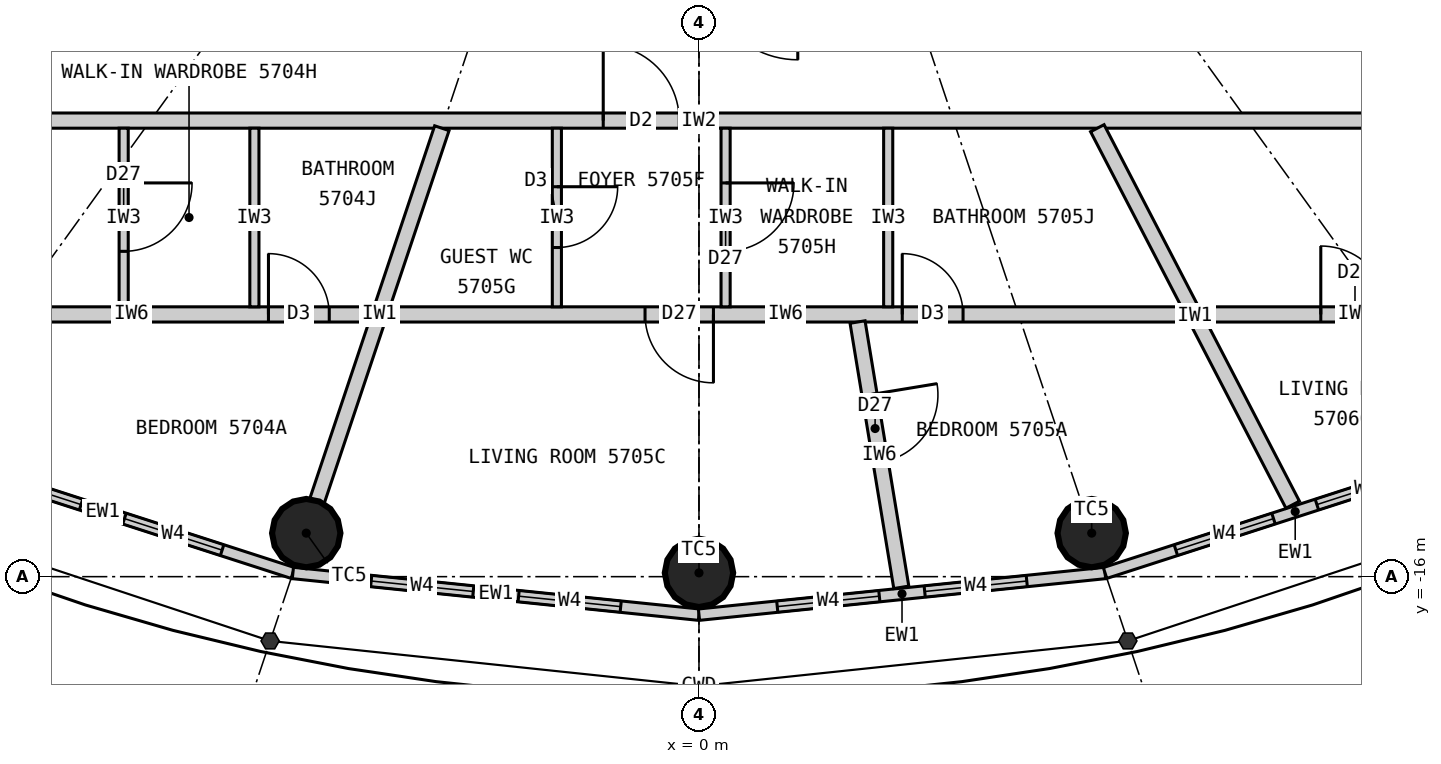
"""IFC4 building model, lengths in metres.
Left out: names, types, materials, properties, quantities, classifications, styles, units other than length and angle.
Written with IfcOpenShell. Run it as: python <this file> out.ifc"""

import sys

from ifc_helpers import new_model, si_unit, direction, frame, frame_2d, origin, origin_2d, place, context, subcontext, project, spatial, rectangle, circle, extrude, element, fill, save


model = new_model("IFC4")
c1 = context("Model", 3, precision=1e-05, world=origin(), true_north=direction((0.0, 1.0)))
c2 = subcontext(c1, "Body", "Model", "MODEL_VIEW")
j1 = project(units=[si_unit("LENGTHUNIT", "METRE"), si_unit("PLANEANGLEUNIT", "RADIAN")], contexts=[c1])
p1 = place(None, origin())
s1 = spatial("IfcSite", under=j1, at=p1, CompositionType="ELEMENT")
p2 = place(p1, origin())
s2 = spatial("IfcBuilding", under=s1, at=p2, CompositionType="ELEMENT")
p3 = place(p2, frame((0.0, 0.0, 212.7)))
s3 = spatial("IfcBuildingStorey", under=s2, at=p3, CompositionType="ELEMENT", Elevation=212.7)
for number, where, z_axis, x_axis in (
    (1, (-5.167, -15.427, 0.0), (0.0, 0.0, 1.0), (1.0, 0.0, 0.0)),
    (2, (0.0, -15.95, 0.0), (0.0, 0.0, 1.0), (1.0, 0.0, 0.0)),
    (3, (5.167, -15.427, 0.0), (0.0, 0.0, 1.0), (1.0, 0.0, 0.0)),
):
    element("IfcColumn", number, at=place(p3, frame(where, z_axis=z_axis, x_axis=x_axis)), inside=s3, PredefinedType="COLUMN", context=c2, shape_type="SweptSolid", body=[
        extrude(circle(Radius=0.45, at=origin_2d()), origin(), (0.0, 0.0, 1.0), 3.3),
    ])
p4 = place(p3, frame((-10.346, -14.336, 0.0), z_axis=(0.0, 0.0, 1.0), x_axis=(0.951644702515, -0.307200846638, 0.0)))
e4 = element("IfcWall", 4, at=p4, inside=s3, PredefinedType="ELEMENTEDWALL", context=c2, shape_type="SweptSolid", body=[
    extrude(rectangle(XDim=5.258, YDim=0.15, at=frame_2d((2.629, 0.0))), origin(), (0.0, 0.0, 1.0), 3.12),
])
p5 = place(p4, frame((0.979, 0.0, 0.9)))
e5 = element("IfcOpeningElement", 5, at=p5, cuts=e4, PredefinedType="OPENING", context=c2, shape_type="SweptSolid", body=[
    extrude(rectangle(XDim=1.35, YDim=1.9, at=frame_2d((0.675, 0.95))), frame((0.0, 0.085, 0.0), z_axis=(0.0, -1.0, 0.0), x_axis=(1.0, 0.0, 0.0)), (0.0, 0.0, 1.0), 0.17),
])
p6 = place(p4, frame((2.929, 0.0, 0.9)))
e6 = element("IfcOpeningElement", 6, at=p6, cuts=e4, PredefinedType="OPENING", context=c2, shape_type="SweptSolid", body=[
    extrude(rectangle(XDim=1.35, YDim=1.9, at=frame_2d((0.675, 0.95))), frame((0.0, 0.085, 0.0), z_axis=(0.0, -1.0, 0.0), x_axis=(1.0, 0.0, 0.0)), (0.0, 0.0, 1.0), 0.17),
])
p7 = place(p3, frame((-5.343, -15.952, 0.0), z_axis=(0.0, 0.0, 1.0), x_axis=(0.994774574972, -0.102095763818, 0.0)))
e7 = element("IfcWall", 7, at=p7, inside=s3, PredefinedType="ELEMENTEDWALL", context=c2, shape_type="SweptSolid", body=[
    extrude(rectangle(XDim=5.371, YDim=0.15, at=frame_2d((2.686, 0.0))), origin(), (0.0, 0.0, 1.0), 3.12),
])
p8 = place(p7, frame((1.035, 0.0, 0.9)))
e8 = element("IfcOpeningElement", 8, at=p8, cuts=e7, PredefinedType="OPENING", context=c2, shape_type="SweptSolid", body=[
    extrude(rectangle(XDim=1.35, YDim=1.9, at=frame_2d((0.675, 0.95))), frame((0.0, 0.085, 0.0), z_axis=(0.0, -1.0, 0.0), x_axis=(1.0, 0.0, 0.0)), (0.0, 0.0, 1.0), 0.17),
])
p9 = place(p7, frame((2.985, 0.0, 0.9)))
e9 = element("IfcOpeningElement", 9, at=p9, cuts=e7, PredefinedType="OPENING", context=c2, shape_type="SweptSolid", body=[
    extrude(rectangle(XDim=1.35, YDim=1.9, at=frame_2d((0.675, 0.95))), frame((0.0, 0.085, 0.0), z_axis=(0.0, -1.0, 0.0), x_axis=(1.0, 0.0, 0.0)), (0.0, 0.0, 1.0), 0.17),
])
p10 = place(p3, frame((0.0, -16.5, 0.0), z_axis=(0.0, 0.0, 1.0), x_axis=(0.994774574972, 0.102095763818, 0.0)))
e10 = element("IfcWall", 10, at=p10, inside=s3, PredefinedType="ELEMENTEDWALL", context=c2, shape_type="SweptSolid", body=[
    extrude(rectangle(XDim=5.371, YDim=0.15, at=frame_2d((2.686, 0.0))), origin(), (0.0, 0.0, 1.0), 3.12),
])
p11 = place(p10, frame((1.035, 0.0, 0.9)))
e11 = element("IfcOpeningElement", 11, at=p11, cuts=e10, PredefinedType="OPENING", context=c2, shape_type="SweptSolid", body=[
    extrude(rectangle(XDim=1.35, YDim=1.9, at=frame_2d((0.675, 0.95))), frame((0.0, 0.085, 0.0), z_axis=(0.0, -1.0, 0.0), x_axis=(1.0, 0.0, 0.0)), (0.0, 0.0, 1.0), 0.17),
])
p12 = place(p10, frame((2.985, 0.0, 0.9)))
e12 = element("IfcOpeningElement", 12, at=p12, cuts=e10, PredefinedType="OPENING", context=c2, shape_type="SweptSolid", body=[
    extrude(rectangle(XDim=1.35, YDim=1.9, at=frame_2d((0.675, 0.95))), frame((0.0, 0.085, 0.0), z_axis=(0.0, -1.0, 0.0), x_axis=(1.0, 0.0, 0.0)), (0.0, 0.0, 1.0), 0.17),
])
p13 = place(p3, frame((5.343, -15.952, 0.0), z_axis=(0.0, 0.0, 1.0), x_axis=(0.951644702515, 0.307200846638, 0.0)))
e13 = element("IfcWall", 13, at=p13, inside=s3, PredefinedType="ELEMENTEDWALL", context=c2, shape_type="SweptSolid", body=[
    extrude(rectangle(XDim=5.258, YDim=0.15, at=frame_2d((2.629, 0.0))), origin(), (0.0, 0.0, 1.0), 3.12),
])
p14 = place(p13, frame((0.979, 0.0, 0.9)))
e14 = element("IfcOpeningElement", 14, at=p14, cuts=e13, PredefinedType="OPENING", context=c2, shape_type="SweptSolid", body=[
    extrude(rectangle(XDim=1.35, YDim=1.9, at=frame_2d((0.675, 0.95))), frame((0.0, 0.085, 0.0), z_axis=(0.0, -1.0, 0.0), x_axis=(1.0, 0.0, 0.0)), (0.0, 0.0, 1.0), 0.17),
])
p15 = place(p13, frame((2.929, 0.0, 0.9)))
e15 = element("IfcOpeningElement", 15, at=p15, cuts=e13, PredefinedType="OPENING", context=c2, shape_type="SweptSolid", body=[
    extrude(rectangle(XDim=1.35, YDim=1.9, at=frame_2d((0.675, 0.95))), frame((0.0, 0.085, 0.0), z_axis=(0.0, -1.0, 0.0), x_axis=(1.0, 0.0, 0.0)), (0.0, 0.0, 1.0), 0.17),
])
p16 = place(p3, frame((11.1, -10.0, 0.0), z_axis=(0.0, 0.0, 1.0), x_axis=(-1.0, 0.0, 0.0)))
e16 = element("IfcWall", 16, at=p16, inside=s3, PredefinedType="PARTITIONING", context=c2, shape_type="SweptSolid", body=[
    extrude(rectangle(XDim=22.2, YDim=0.2, at=frame_2d((11.1, 0.0))), origin(), (0.0, 0.0, 1.0), 3.12),
])
p17 = place(p16, frame((11.36, 0.0, 0.0)))
e17 = element("IfcOpeningElement", 17, at=p17, cuts=e16, PredefinedType="OPENING", context=c2, shape_type="SweptSolid", body=[
    extrude(rectangle(XDim=1.0, YDim=2.2, at=frame_2d((0.5, 1.1))), frame((0.0, 0.11, 0.0), z_axis=(0.0, -1.0, 0.0), x_axis=(1.0, 0.0, 0.0)), (0.0, 0.0, 1.0), 0.22),
])
p18 = place(p16, frame((0.595, 0.0, 0.0)))
e18 = element("IfcOpeningElement", 18, at=p18, cuts=e16, PredefinedType="OPENING", context=c2, shape_type="SweptSolid", body=[
    extrude(rectangle(XDim=1.0, YDim=2.2, at=frame_2d((0.5, 1.1))), frame((0.0, 0.11, 0.0), z_axis=(0.0, -1.0, 0.0), x_axis=(1.0, 0.0, 0.0)), (0.0, 0.0, 1.0), 0.22),
])
p19 = place(p3, frame((-3.383, -10.1, 0.0), z_axis=(0.0, 0.0, 1.0), x_axis=(-0.317602151035, -0.948224063003, 0.0)))
e19 = element("IfcWall", 19, at=p19, inside=s3, PredefinedType="PARTITIONING", context=c2, shape_type="SweptSolid", body=[
    extrude(rectangle(XDim=5.168, YDim=0.2, at=frame_2d((2.584, 0.0))), origin(), (0.0, 0.0, 1.0), 2.42),
])
p20 = place(p3, frame((5.241, -10.1, 0.0), z_axis=(0.0, 0.0, 1.0), x_axis=(0.460603196597, -0.887606160008, 0.0)))
e20 = element("IfcWall", 20, at=p20, inside=s3, PredefinedType="PARTITIONING", context=c2, shape_type="SweptSolid", body=[
    extrude(rectangle(XDim=5.58, YDim=0.2, at=frame_2d((2.79, 0.0))), origin(), (0.0, 0.0, 1.0), 3.12),
])
p21 = place(p3, frame((-10.609, -12.55, 0.0), z_axis=(0.0, 0.0, 1.0), x_axis=(1.0, 0.0, 0.0)))
e21 = element("IfcWall", 21, at=p21, inside=s3, PredefinedType="PARTITIONING", context=c2, shape_type="SweptSolid", body=[
    extrude(rectangle(XDim=6.284, YDim=0.2, at=frame_2d((3.142, 0.0))), origin(), (0.0, 0.0, 1.0), 3.12),
])
p22 = place(p21, frame((4.944, 0.0, 0.0)))
e22 = element("IfcOpeningElement", 22, at=p22, cuts=e21, PredefinedType="OPENING", context=c2, shape_type="SweptSolid", body=[
    extrude(rectangle(XDim=0.8, YDim=2.1, at=frame_2d((0.4, 1.05))), frame((0.0, 0.11, 0.0), z_axis=(0.0, -1.0, 0.0), x_axis=(1.0, 0.0, 0.0)), (0.0, 0.0, 1.0), 0.22),
])
p23 = place(p3, frame((-7.569, -10.1, 0.0), z_axis=(0.0, 0.0, 1.0), x_axis=(0.0, -1.0, 0.0)))
e23 = element("IfcWall", 23, at=p23, inside=s3, PredefinedType="PARTITIONING", context=c2, shape_type="SweptSolid", body=[
    extrude(rectangle(XDim=2.35, YDim=0.12, at=frame_2d((1.175, 0.0))), origin(), (0.0, 0.0, 1.0), 3.12),
])
p24 = place(p23, frame((0.72, 0.0, 0.0)))
e24 = element("IfcOpeningElement", 24, at=p24, cuts=e23, PredefinedType="OPENING", context=c2, shape_type="SweptSolid", body=[
    extrude(rectangle(XDim=0.9, YDim=2.1, at=frame_2d((0.45, 1.05))), frame((0.0, 0.07, 0.0), z_axis=(0.0, -1.0, 0.0), x_axis=(1.0, 0.0, 0.0)), (0.0, 0.0, 1.0), 0.14),
])
p25 = place(p3, frame((-5.849, -10.1, 0.0), z_axis=(0.0, 0.0, 1.0), x_axis=(0.0, -1.0, 0.0)))
e25 = element("IfcWall", 25, at=p25, inside=s3, PredefinedType="PARTITIONING", context=c2, shape_type="SweptSolid", body=[
    extrude(rectangle(XDim=2.35, YDim=0.12, at=frame_2d((1.175, 0.0))), origin(), (0.0, 0.0, 1.0), 3.12),
])
p26 = place(p3, frame((-4.082, -12.55, 0.0), z_axis=(0.0, 0.0, 1.0), x_axis=(1.0, 0.0, 0.0)))
e26 = element("IfcWall", 26, at=p26, inside=s3, PredefinedType="PARTITIONING", context=c2, shape_type="SweptSolid", body=[
    extrude(rectangle(XDim=10.446, YDim=0.2, at=frame_2d((5.223, 0.0))), origin(), (0.0, 0.0, 1.0), 3.12),
])
p27 = place(p26, frame((6.757, 0.0, 0.0)))
e27 = element("IfcOpeningElement", 27, at=p27, cuts=e26, PredefinedType="OPENING", context=c2, shape_type="SweptSolid", body=[
    extrude(rectangle(XDim=0.8, YDim=2.1, at=frame_2d((0.4, 1.05))), frame((0.0, 0.11, 0.0), z_axis=(0.0, -1.0, 0.0), x_axis=(1.0, 0.0, 0.0)), (0.0, 0.0, 1.0), 0.22),
])
p28 = place(p26, frame((3.372, 0.0, 0.0)))
e28 = element("IfcOpeningElement", 28, at=p28, cuts=e26, PredefinedType="OPENING", context=c2, shape_type="SweptSolid", body=[
    extrude(rectangle(XDim=0.9, YDim=2.1, at=frame_2d((0.45, 1.05))), frame((0.0, 0.11, 0.0), z_axis=(0.0, -1.0, 0.0), x_axis=(1.0, 0.0, 0.0)), (0.0, 0.0, 1.0), 0.22),
])
p29 = place(p3, frame((2.086, -12.65, 0.0), z_axis=(0.0, 0.0, 1.0), x_axis=(0.162664077359, -0.986681507852, 0.0)))
e29 = element("IfcWall", 29, at=p29, inside=s3, PredefinedType="PARTITIONING", context=c2, shape_type="SweptSolid", body=[
    extrude(rectangle(XDim=3.538, YDim=0.2, at=frame_2d((1.769, 0.0))), origin(), (0.0, 0.0, 1.0), 3.12),
])
p30 = place(p29, frame((0.97, 0.0, 0.0)))
e30 = element("IfcOpeningElement", 30, at=p30, cuts=e29, PredefinedType="OPENING", context=c2, shape_type="SweptSolid", body=[
    extrude(rectangle(XDim=0.9, YDim=2.1, at=frame_2d((0.45, 1.05))), frame((0.0, 0.11, 0.0), z_axis=(0.0, -1.0, 0.0), x_axis=(1.0, 0.0, 0.0)), (0.0, 0.0, 1.0), 0.22),
])
p31 = place(p3, frame((-1.87, -10.1, 0.0), z_axis=(0.0, 0.0, 1.0), x_axis=(0.0, -1.0, 0.0)))
e31 = element("IfcWall", 31, at=p31, inside=s3, PredefinedType="PARTITIONING", context=c2, shape_type="SweptSolid", body=[
    extrude(rectangle(XDim=2.35, YDim=0.12, at=frame_2d((1.175, 0.0))), origin(), (0.0, 0.0, 1.0), 3.12),
])
p32 = place(p31, frame((0.77, 0.0, 0.0)))
e32 = element("IfcOpeningElement", 32, at=p32, cuts=e31, PredefinedType="OPENING", context=c2, shape_type="SweptSolid", body=[
    extrude(rectangle(XDim=0.8, YDim=2.1, at=frame_2d((0.4, 1.05))), frame((0.0, 0.07, 0.0), z_axis=(0.0, -1.0, 0.0), x_axis=(1.0, 0.0, 0.0)), (0.0, 0.0, 1.0), 0.14),
])
p33 = place(p3, frame((0.35, -10.1, 0.0), z_axis=(0.0, 0.0, 1.0), x_axis=(0.0, -1.0, 0.0)))
e33 = element("IfcWall", 33, at=p33, inside=s3, PredefinedType="PARTITIONING", context=c2, shape_type="SweptSolid", body=[
    extrude(rectangle(XDim=2.35, YDim=0.12, at=frame_2d((1.175, 0.0))), origin(), (0.0, 0.0, 1.0), 3.12),
])
p34 = place(p33, frame((0.72, 0.0, 0.0)))
e34 = element("IfcOpeningElement", 34, at=p34, cuts=e33, PredefinedType="OPENING", context=c2, shape_type="SweptSolid", body=[
    extrude(rectangle(XDim=0.9, YDim=2.1, at=frame_2d((0.45, 1.05))), frame((0.0, 0.07, 0.0), z_axis=(0.0, -1.0, 0.0), x_axis=(1.0, 0.0, 0.0)), (0.0, 0.0, 1.0), 0.14),
])
p35 = place(p3, frame((2.49, -10.1, 0.0), z_axis=(0.0, 0.0, 1.0), x_axis=(0.0, -1.0, 0.0)))
e35 = element("IfcWall", 35, at=p35, inside=s3, PredefinedType="PARTITIONING", context=c2, shape_type="SweptSolid", body=[
    extrude(rectangle(XDim=2.35, YDim=0.12, at=frame_2d((1.175, 0.0))), origin(), (0.0, 0.0, 1.0), 3.12),
])
p36 = place(p3, frame((6.661, -12.55, 0.0), z_axis=(0.0, 0.0, 1.0), x_axis=(1.0, 0.0, 0.0)))
e36 = element("IfcWall", 36, at=p36, inside=s3, PredefinedType="PARTITIONING", context=c2, shape_type="SweptSolid", body=[
    extrude(rectangle(XDim=3.947, YDim=0.2, at=frame_2d((1.974, 0.0))), origin(), (0.0, 0.0, 1.0), 3.12),
])
p37 = place(p36, frame((1.52, 0.0, 0.0)))
e37 = element("IfcOpeningElement", 37, at=p37, cuts=e36, PredefinedType="OPENING", context=c2, shape_type="SweptSolid", body=[
    extrude(rectangle(XDim=0.9, YDim=2.1, at=frame_2d((0.45, 1.05))), frame((0.0, 0.11, 0.0), z_axis=(0.0, -1.0, 0.0), x_axis=(1.0, 0.0, 0.0)), (0.0, 0.0, 1.0), 0.22),
])
p38 = place(p5, origin())
e38 = element("IfcWindow", 38, at=p38, inside=s3, PartitioningType="SINGLE_PANEL", PredefinedType="WINDOW", context=c2, shape_type="SweptSolid", body=[
    extrude(rectangle(XDim=1.35, YDim=1.9, at=frame_2d((0.675, 0.95))), frame((0.0, 0.03, 0.0), z_axis=(0.0, -1.0, 0.0), x_axis=(1.0, 0.0, 0.0)), (0.0, 0.0, 1.0), 0.06),
])
fill(e5, e38)
p39 = place(p6, origin())
e39 = element("IfcWindow", 39, at=p39, inside=s3, PartitioningType="SINGLE_PANEL", PredefinedType="WINDOW", context=c2, shape_type="SweptSolid", body=[
    extrude(rectangle(XDim=1.35, YDim=1.9, at=frame_2d((0.675, 0.95))), frame((0.0, 0.03, 0.0), z_axis=(0.0, -1.0, 0.0), x_axis=(1.0, 0.0, 0.0)), (0.0, 0.0, 1.0), 0.06),
])
fill(e6, e39)
p40 = place(p8, origin())
e40 = element("IfcWindow", 40, at=p40, inside=s3, PartitioningType="SINGLE_PANEL", PredefinedType="WINDOW", context=c2, shape_type="SweptSolid", body=[
    extrude(rectangle(XDim=1.35, YDim=1.9, at=frame_2d((0.675, 0.95))), frame((0.0, 0.03, 0.0), z_axis=(0.0, -1.0, 0.0), x_axis=(1.0, 0.0, 0.0)), (0.0, 0.0, 1.0), 0.06),
])
fill(e8, e40)
p41 = place(p9, origin())
e41 = element("IfcWindow", 41, at=p41, inside=s3, PartitioningType="SINGLE_PANEL", PredefinedType="WINDOW", context=c2, shape_type="SweptSolid", body=[
    extrude(rectangle(XDim=1.35, YDim=1.9, at=frame_2d((0.675, 0.95))), frame((0.0, 0.03, 0.0), z_axis=(0.0, -1.0, 0.0), x_axis=(1.0, 0.0, 0.0)), (0.0, 0.0, 1.0), 0.06),
])
fill(e9, e41)
p42 = place(p11, origin())
e42 = element("IfcWindow", 42, at=p42, inside=s3, PartitioningType="SINGLE_PANEL", PredefinedType="WINDOW", context=c2, shape_type="SweptSolid", body=[
    extrude(rectangle(XDim=1.35, YDim=1.9, at=frame_2d((0.675, 0.95))), frame((0.0, 0.03, 0.0), z_axis=(0.0, -1.0, 0.0), x_axis=(1.0, 0.0, 0.0)), (0.0, 0.0, 1.0), 0.06),
])
fill(e11, e42)
p43 = place(p12, origin())
e43 = element("IfcWindow", 43, at=p43, inside=s3, PartitioningType="SINGLE_PANEL", PredefinedType="WINDOW", context=c2, shape_type="SweptSolid", body=[
    extrude(rectangle(XDim=1.35, YDim=1.9, at=frame_2d((0.675, 0.95))), frame((0.0, 0.03, 0.0), z_axis=(0.0, -1.0, 0.0), x_axis=(1.0, 0.0, 0.0)), (0.0, 0.0, 1.0), 0.06),
])
fill(e12, e43)
p44 = place(p14, origin())
e44 = element("IfcWindow", 44, at=p44, inside=s3, PartitioningType="SINGLE_PANEL", PredefinedType="WINDOW", context=c2, shape_type="SweptSolid", body=[
    extrude(rectangle(XDim=1.35, YDim=1.9, at=frame_2d((0.675, 0.95))), frame((0.0, 0.03, 0.0), z_axis=(0.0, -1.0, 0.0), x_axis=(1.0, 0.0, 0.0)), (0.0, 0.0, 1.0), 0.06),
])
fill(e14, e44)
p45 = place(p15, origin())
e45 = element("IfcWindow", 45, at=p45, inside=s3, PartitioningType="SINGLE_PANEL", PredefinedType="WINDOW", context=c2, shape_type="SweptSolid", body=[
    extrude(rectangle(XDim=1.35, YDim=1.9, at=frame_2d((0.675, 0.95))), frame((0.0, 0.03, 0.0), z_axis=(0.0, -1.0, 0.0), x_axis=(1.0, 0.0, 0.0)), (0.0, 0.0, 1.0), 0.06),
])
fill(e15, e45)
p46 = place(p24, origin())
e46 = element("IfcDoor", 46, at=p46, inside=s3, OperationType="SINGLE_SWING_LEFT", PredefinedType="DOOR", context=c2, shape_type="SweptSolid", body=[
    extrude(rectangle(XDim=0.9, YDim=2.1, at=frame_2d((0.45, 1.05))), frame((0.0, 0.025, 0.0), z_axis=(0.0, -1.0, 0.0), x_axis=(1.0, 0.0, 0.0)), (0.0, 0.0, 1.0), 0.05),
])
fill(e24, e46)
p47 = place(p22, origin())
e47 = element("IfcDoor", 47, at=p47, inside=s3, OperationType="SINGLE_SWING_LEFT", PredefinedType="DOOR", context=c2, shape_type="SweptSolid", body=[
    extrude(rectangle(XDim=0.8, YDim=2.1, at=frame_2d((0.4, 1.05))), frame((0.0, 0.025, 0.0), z_axis=(0.0, -1.0, 0.0), x_axis=(1.0, 0.0, 0.0)), (0.0, 0.0, 1.0), 0.05),
])
fill(e22, e47)
p48 = place(p17, origin())
e48 = element("IfcDoor", 48, at=p48, inside=s3, OperationType="SINGLE_SWING_RIGHT", PredefinedType="DOOR", context=c2, shape_type="SweptSolid", body=[
    extrude(rectangle(XDim=1.0, YDim=2.2, at=frame_2d((0.5, 1.1))), frame((0.0, 0.025, 0.0), z_axis=(0.0, -1.0, 0.0), x_axis=(1.0, 0.0, 0.0)), (0.0, 0.0, 1.0), 0.05),
])
fill(e17, e48)
p49 = place(p32, origin())
e49 = element("IfcDoor", 49, at=p49, inside=s3, OperationType="SINGLE_SWING_LEFT", PredefinedType="DOOR", context=c2, shape_type="SweptSolid", body=[
    extrude(rectangle(XDim=0.8, YDim=2.1, at=frame_2d((0.4, 1.05))), frame((0.0, 0.025, 0.0), z_axis=(0.0, -1.0, 0.0), x_axis=(1.0, 0.0, 0.0)), (0.0, 0.0, 1.0), 0.05),
])
fill(e32, e49)
p50 = place(p34, origin())
e50 = element("IfcDoor", 50, at=p50, inside=s3, OperationType="SINGLE_SWING_LEFT", PredefinedType="DOOR", context=c2, shape_type="SweptSolid", body=[
    extrude(rectangle(XDim=0.9, YDim=2.1, at=frame_2d((0.45, 1.05))), frame((0.0, 0.025, 0.0), z_axis=(0.0, -1.0, 0.0), x_axis=(1.0, 0.0, 0.0)), (0.0, 0.0, 1.0), 0.05),
])
fill(e34, e50)
p51 = place(p27, origin())
e51 = element("IfcDoor", 51, at=p51, inside=s3, OperationType="SINGLE_SWING_LEFT", PredefinedType="DOOR", context=c2, shape_type="SweptSolid", body=[
    extrude(rectangle(XDim=0.8, YDim=2.1, at=frame_2d((0.4, 1.05))), frame((0.0, 0.025, 0.0), z_axis=(0.0, -1.0, 0.0), x_axis=(1.0, 0.0, 0.0)), (0.0, 0.0, 1.0), 0.05),
])
fill(e27, e51)
p52 = place(p28, origin())
e52 = element("IfcDoor", 52, at=p52, inside=s3, OperationType="SINGLE_SWING_RIGHT", PredefinedType="DOOR", context=c2, shape_type="SweptSolid", body=[
    extrude(rectangle(XDim=0.9, YDim=2.1, at=frame_2d((0.45, 1.05))), frame((0.0, 0.025, 0.0), z_axis=(0.0, -1.0, 0.0), x_axis=(1.0, 0.0, 0.0)), (0.0, 0.0, 1.0), 0.05),
])
fill(e28, e52)
p53 = place(p30, origin())
e53 = element("IfcDoor", 53, at=p53, inside=s3, OperationType="SINGLE_SWING_LEFT", PredefinedType="DOOR", context=c2, shape_type="SweptSolid", body=[
    extrude(rectangle(XDim=0.9, YDim=2.1, at=frame_2d((0.45, 1.05))), frame((0.0, 0.025, 0.0), z_axis=(0.0, -1.0, 0.0), x_axis=(1.0, 0.0, 0.0)), (0.0, 0.0, 1.0), 0.05),
])
fill(e30, e53)
p54 = place(p37, origin())
e54 = element("IfcDoor", 54, at=p54, inside=s3, OperationType="SINGLE_SWING_LEFT", PredefinedType="DOOR", context=c2, shape_type="SweptSolid", body=[
    extrude(rectangle(XDim=0.9, YDim=2.1, at=frame_2d((0.45, 1.05))), frame((0.0, 0.025, 0.0), z_axis=(0.0, -1.0, 0.0), x_axis=(1.0, 0.0, 0.0)), (0.0, 0.0, 1.0), 0.05),
])
fill(e37, e54)
save(model, sys.argv[1])
